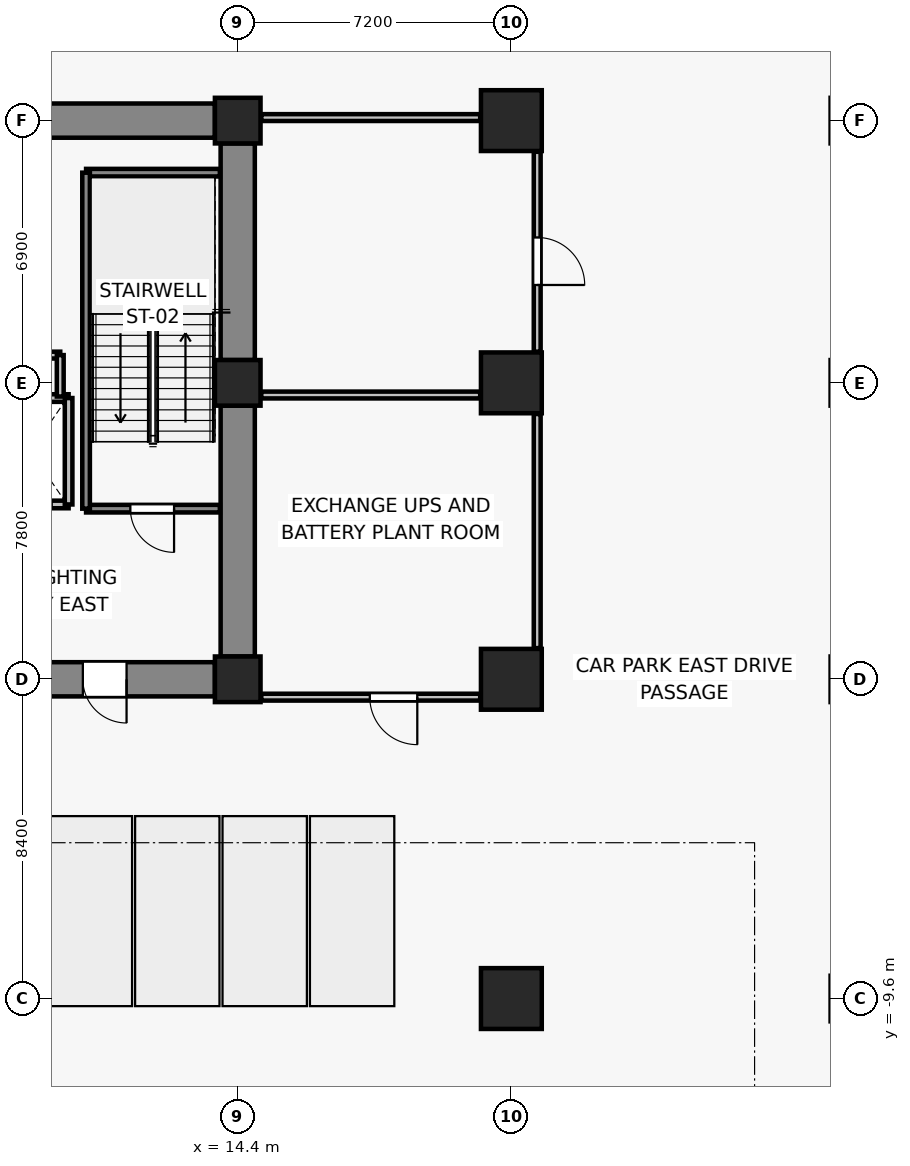
"""IFC4 building model, lengths in metres.
Left out: names, types, materials, properties, quantities, classifications, styles, units other than length and angle.
Written with IfcOpenShell. Run it as: python <this file> out.ifc"""

import sys

from ifc_helpers import new_model, si_unit, direction, frame, frame_2d, origin, origin_2d, place, context, subcontext, project, spatial, rectangle, extrude, source, transform, mapped, element, fill, save


model = new_model("IFC4")
c1 = context("Model", 3, precision=1e-05, world=origin(), true_north=direction((0.0, 1.0)))
c2 = subcontext(c1, "Body", "Model", "MODEL_VIEW")
j1 = project(units=[si_unit("LENGTHUNIT", "METRE"), si_unit("PLANEANGLEUNIT", "RADIAN")], contexts=[c1])
p1 = place(None, origin())
s1 = spatial("IfcSite", under=j1, at=p1, CompositionType="ELEMENT")
p2 = place(p1, origin())
s2 = spatial("IfcBuilding", under=s1, at=p2, CompositionType="ELEMENT")
p3 = place(p2, frame((0.0, 0.0, -4.4)))
s3 = spatial("IfcBuildingStorey", under=s2, at=p3, CompositionType="ELEMENT", Elevation=-4.4)
for number, where, z_axis, x_axis in (
    (1, (14.4, -1.2, 0.0), (0.0, 0.0, 1.0), (1.0, 0.0, 0.0)),
    (2, (14.4, 6.6, 0.0), (0.0, 0.0, 1.0), (1.0, 0.0, 0.0)),
    (3, (14.4, 13.5, 0.0), (0.0, 0.0, 1.0), (1.0, 0.0, 0.0)),
):
    element("IfcColumn", number, at=place(p3, frame(where, z_axis=z_axis, x_axis=x_axis)), inside=s3, PredefinedType="COLUMN", context=c2, shape_type="SweptSolid", body=[
        extrude(rectangle(XDim=1.2, YDim=1.2, at=origin_2d()), origin(), (0.0, 0.0, 1.0), 4.4),
    ])
for number, where, z_axis, x_axis in (
    (4, (21.6, -9.6, 0.0), (0.0, 0.0, 1.0), (1.0, 0.0, 0.0)),
    (5, (21.6, -1.2, 0.0), (0.0, 0.0, 1.0), (1.0, 0.0, 0.0)),
    (6, (21.6, 6.6, 0.0), (0.0, 0.0, 1.0), (1.0, 0.0, 0.0)),
    (7, (21.6, 13.5, 0.0), (0.0, 0.0, 1.0), (1.0, 0.0, 0.0)),
):
    element("IfcColumn", number, at=place(p3, frame(where, z_axis=z_axis, x_axis=x_axis)), inside=s3, PredefinedType="COLUMN", context=c2, shape_type="SweptSolid", body=[
        extrude(rectangle(XDim=1.6, YDim=1.6, at=origin_2d()), origin(), (0.0, 0.0, 1.0), 4.4),
    ])
p4 = place(p3, frame((7.8, 13.5, 0.0), z_axis=(0.0, 0.0, 1.0), x_axis=(1.0, 0.0, 0.0)))
e8 = element("IfcWall", 8, at=p4, inside=s3, PredefinedType="SHEAR", context=c2, shape_type="SweptSolid", body=[
    extrude(rectangle(XDim=6.0, YDim=0.9, at=frame_2d((3.0, 0.0))), origin(), (0.0, 0.0, 1.0), 4.1),
])
p5 = place(p3, frame((14.4, -0.6, 0.0), z_axis=(0.0, 0.0, 1.0), x_axis=(0.0, 1.0, 0.0)))
e9 = element("IfcWall", 9, at=p5, inside=s3, PredefinedType="SHEAR", context=c2, shape_type="SweptSolid", body=[
    extrude(rectangle(XDim=6.6, YDim=0.9, at=frame_2d((3.3, 0.0))), origin(), (0.0, 0.0, 1.0), 4.1),
])
p6 = place(p3, frame((14.4, 7.2, 0.0), z_axis=(0.0, 0.0, 1.0), x_axis=(0.0, 1.0, 0.0)))
e10 = element("IfcWall", 10, at=p6, inside=s3, PredefinedType="SHEAR", context=c2, shape_type="SweptSolid", body=[
    extrude(rectangle(XDim=5.7, YDim=0.9, at=frame_2d((2.85, 0.0))), origin(), (0.0, 0.0, 1.0), 4.1),
])
p7 = place(p3, frame((13.8, -1.2, 0.0), z_axis=(0.0, 0.0, 1.0), x_axis=(-1.0, 0.0, 0.0)))
e11 = element("IfcWall", 11, at=p7, inside=s3, PredefinedType="SHEAR", context=c2, shape_type="SweptSolid", body=[
    extrude(rectangle(XDim=6.0, YDim=0.9, at=frame_2d((3.0, 0.0))), origin(), (0.0, 0.0, 1.0), 4.1),
])
p8 = place(p7, frame((2.325, 0.0, 0.0)))
e12 = element("IfcOpeningElement", 12, at=p8, cuts=e11, PredefinedType="OPENING", context=c2, shape_type="SweptSolid", body=[
    extrude(rectangle(XDim=1.15, YDim=2.15, at=frame_2d((0.575, 1.075))), frame((0.0, 0.46, 0.0), z_axis=(0.0, -1.0, 0.0), x_axis=(1.0, 0.0, 0.0)), (0.0, 0.0, 1.0), 0.92),
])
p9 = place(p3, frame((9.95, 3.4, 0.0), z_axis=(0.0, 0.0, 1.0), x_axis=(-1.0, 0.0, 0.0)))
e13 = element("IfcWall", 13, at=p9, inside=s3, PredefinedType="SOLIDWALL", context=c2, shape_type="SweptSolid", body=[
    extrude(rectangle(XDim=2.0, YDim=0.2, at=frame_2d((1.0, 0.0))), origin(), (0.0, 0.0, 1.0), 4.1),
])
p10 = place(p9, frame((0.45, 0.0, 0.0)))
e14 = element("IfcOpeningElement", 14, at=p10, cuts=e13, PredefinedType="OPENING", context=c2, shape_type="SweptSolid", body=[
    extrude(rectangle(XDim=1.1, YDim=2.2, at=frame_2d((0.55, 1.1))), frame((0.0, 0.11, 0.0), z_axis=(0.0, -1.0, 0.0), x_axis=(1.0, 0.0, 0.0)), (0.0, 0.0, 1.0), 0.22),
])
p11 = place(p3, frame((7.95, 6.2, 0.0), z_axis=(0.0, 0.0, 1.0), x_axis=(1.0, 0.0, 0.0)))
e15 = element("IfcWall", 15, at=p11, inside=s3, PredefinedType="SOLIDWALL", context=c2, shape_type="SweptSolid", body=[
    extrude(rectangle(XDim=2.0, YDim=0.2, at=frame_2d((1.0, 0.0))), origin(), (0.0, 0.0, 1.0), 4.1),
])
p12 = place(p3, frame((9.95, 6.2, 0.0), z_axis=(0.0, 0.0, 1.0), x_axis=(0.0, -1.0, 0.0)))
e16 = element("IfcWall", 16, at=p12, inside=s3, PredefinedType="SOLIDWALL", context=c2, shape_type="SweptSolid", body=[
    extrude(rectangle(XDim=2.8, YDim=0.2, at=frame_2d((1.4, 0.0))), origin(), (0.0, 0.0, 1.0), 4.1),
])
p13 = place(p3, frame((13.93, 3.29, 0.0), z_axis=(0.0, 0.0, 1.0), x_axis=(-1.0, 0.0, 0.0)))
e17 = element("IfcWall", 17, at=p13, inside=s3, PredefinedType="SOLIDWALL", context=c2, shape_type="SweptSolid", body=[
    extrude(rectangle(XDim=3.52, YDim=0.2, at=frame_2d((1.76, 0.0))), origin(), (0.0, 0.0, 1.0), 4.1),
])
p14 = place(p13, frame((1.205, 0.0, 0.0)))
e18 = element("IfcOpeningElement", 18, at=p14, cuts=e17, PredefinedType="OPENING", context=c2, shape_type="SweptSolid", body=[
    extrude(rectangle(XDim=1.15, YDim=2.15, at=frame_2d((0.575, 1.075))), frame((0.0, 0.11, 0.0), z_axis=(0.0, -1.0, 0.0), x_axis=(1.0, 0.0, 0.0)), (0.0, 0.0, 1.0), 0.22),
])
p15 = place(p3, frame((10.41, 12.13, 0.0), z_axis=(0.0, 0.0, 1.0), x_axis=(1.0, 0.0, 0.0)))
e19 = element("IfcWall", 19, at=p15, inside=s3, PredefinedType="SOLIDWALL", context=c2, shape_type="SweptSolid", body=[
    extrude(rectangle(XDim=3.52, YDim=0.2, at=frame_2d((1.76, 0.0))), origin(), (0.0, 0.0, 1.0), 4.1),
])
p16 = place(p3, frame((10.41, 3.29, 0.0), z_axis=(0.0, 0.0, 1.0), x_axis=(0.0, 1.0, 0.0)))
e20 = element("IfcWall", 20, at=p16, inside=s3, PredefinedType="SOLIDWALL", context=c2, shape_type="SweptSolid", body=[
    extrude(rectangle(XDim=8.84, YDim=0.2, at=frame_2d((4.42, 0.0))), origin(), (0.0, 0.0, 1.0), 4.1),
])
p17 = place(p3, frame((7.47, 7.33, 0.0), z_axis=(0.0, 0.0, 1.0), x_axis=(1.0, 0.0, 0.0)))
e21 = element("IfcWall", 21, at=p17, inside=s3, PredefinedType="PARTITIONING", context=c2, shape_type="SweptSolid", body=[
    extrude(rectangle(XDim=2.26, YDim=0.18, at=frame_2d((1.13, 0.0))), origin(), (0.0, 0.0, 1.0), 3.19),
])
p18 = place(p17, frame((0.69, 0.0, 0.0)))
e22 = element("IfcOpeningElement", 22, at=p18, cuts=e21, PredefinedType="OPENING", context=c2, shape_type="SweptSolid", body=[
    extrude(rectangle(XDim=0.88, YDim=2.1, at=frame_2d((0.44, 1.05))), frame((0.0, 0.1, 0.0), z_axis=(0.0, -1.0, 0.0), x_axis=(1.0, 0.0, 0.0)), (0.0, 0.0, 1.0), 0.2),
])
p19 = place(p3, frame((9.73, 7.33, 0.0), z_axis=(0.0, 0.0, 1.0), x_axis=(0.0, -1.0, 0.0)))
e23 = element("IfcWall", 23, at=p19, inside=s3, PredefinedType="PARTITIONING", context=c2, shape_type="SweptSolid", body=[
    extrude(rectangle(XDim=1.09, YDim=0.18, at=frame_2d((0.545, 0.0))), origin(), (0.0, 0.0, 1.0), 4.1),
])
p20 = place(p3, frame((20.78, -1.67, 0.0), z_axis=(0.0, 0.0, 1.0), x_axis=(-1.0, 0.0, 0.0)))
e24 = element("IfcWall", 24, at=p20, inside=s3, PredefinedType="PARTITIONING", context=c2, shape_type="SweptSolid", body=[
    extrude(rectangle(XDim=5.76, YDim=0.18, at=frame_2d((2.88, 0.0))), origin(), (0.0, 0.0, 1.0), 4.1),
])
p21 = place(p20, frame((1.655, 0.0, 0.0)))
e25 = element("IfcOpeningElement", 25, at=p21, cuts=e24, PredefinedType="OPENING", context=c2, shape_type="SweptSolid", body=[
    extrude(rectangle(XDim=1.25, YDim=2.15, at=frame_2d((0.625, 1.075))), frame((0.0, 0.1, 0.0), z_axis=(0.0, -1.0, 0.0), x_axis=(1.0, 0.0, 0.0)), (0.0, 0.0, 1.0), 0.2),
])
p22 = place(p3, frame((15.02, 6.28, 0.0), z_axis=(0.0, 0.0, 1.0), x_axis=(1.0, 0.0, 0.0)))
e26 = element("IfcWall", 26, at=p22, inside=s3, PredefinedType="PARTITIONING", context=c2, shape_type="SweptSolid", body=[
    extrude(rectangle(XDim=5.76, YDim=0.18, at=frame_2d((2.88, 0.0))), origin(), (0.0, 0.0, 1.0), 4.1),
])
p23 = place(p3, frame((22.28, 5.78, 0.0), z_axis=(0.0, 0.0, 1.0), x_axis=(0.0, -1.0, 0.0)))
e27 = element("IfcWall", 27, at=p23, inside=s3, PredefinedType="PARTITIONING", context=c2, shape_type="SweptSolid", body=[
    extrude(rectangle(XDim=6.16, YDim=0.18, at=frame_2d((3.08, 0.0))), origin(), (0.0, 0.0, 1.0), 3.473),
])
p24 = place(p3, frame((15.02, 13.58, 0.0), z_axis=(0.0, 0.0, 1.0), x_axis=(1.0, 0.0, 0.0)))
e28 = element("IfcWall", 28, at=p24, inside=s3, PredefinedType="PARTITIONING", context=c2, shape_type="SweptSolid", body=[
    extrude(rectangle(XDim=5.76, YDim=0.18, at=frame_2d((2.88, 0.0))), origin(), (0.0, 0.0, 1.0), 3.19),
])
p25 = place(p3, frame((22.28, 12.68, 0.0), z_axis=(0.0, 0.0, 1.0), x_axis=(0.0, -1.0, 0.0)))
e29 = element("IfcWall", 29, at=p25, inside=s3, PredefinedType="PARTITIONING", context=c2, shape_type="SweptSolid", body=[
    extrude(rectangle(XDim=5.26, YDim=0.18, at=frame_2d((2.63, 0.0))), origin(), (0.0, 0.0, 1.0), 4.1),
])
p26 = place(p25, frame((2.255, 0.0, 0.0)))
e30 = element("IfcOpeningElement", 30, at=p26, cuts=e29, PredefinedType="OPENING", context=c2, shape_type="SweptSolid", body=[
    extrude(rectangle(XDim=1.25, YDim=2.15, at=frame_2d((0.625, 1.075))), frame((0.0, 0.1, 0.0), z_axis=(0.0, -1.0, 0.0), x_axis=(1.0, 0.0, 0.0)), (0.0, 0.0, 1.0), 0.2),
])
m1 = source(origin(), c2, "Body", "SweptSolid", [
    extrude(rectangle(XDim=1.15, YDim=2.15, at=frame_2d((0.575, 1.075))), frame((0.0, 0.025, 0.0), z_axis=(0.0, -1.0, 0.0), x_axis=(1.0, 0.0, 0.0)), (0.0, 0.0, 1.0), 0.05),
])
p27 = place(p14, origin())
e31 = element("IfcDoor", 31, at=p27, inside=s3, OperationType="SINGLE_SWING_LEFT", PredefinedType="DOOR", context=c2, shape_type="MappedRepresentation", body=[
    mapped(m1, transform((0.0, 0.0, 0.0), x_axis=(1.0, 0.0, 0.0), y_axis=(0.0, 1.0, 0.0), z_axis=(0.0, 0.0, 1.0), scale=1.0)),
])
fill(e18, e31)
p28 = place(p8, origin())
e32 = element("IfcDoor", 32, at=p28, inside=s3, OperationType="SINGLE_SWING_LEFT", PredefinedType="DOOR", context=c2, shape_type="MappedRepresentation", body=[
    mapped(m1, transform((0.0, 0.0, 0.0), x_axis=(1.0, 0.0, 0.0), y_axis=(0.0, 1.0, 0.0), z_axis=(0.0, 0.0, 1.0), scale=1.0)),
])
fill(e12, e32)
m2 = source(origin(), c2, "Body", "SweptSolid", [
    extrude(rectangle(XDim=1.25, YDim=2.15, at=frame_2d((0.625, 1.075))), frame((0.0, 0.025, 0.0), z_axis=(0.0, -1.0, 0.0), x_axis=(1.0, 0.0, 0.0)), (0.0, 0.0, 1.0), 0.05),
])
p29 = place(p21, origin())
e33 = element("IfcDoor", 33, at=p29, inside=s3, OperationType="SINGLE_SWING_LEFT", PredefinedType="DOOR", context=c2, shape_type="MappedRepresentation", body=[
    mapped(m2, transform((0.0, 0.0, 0.0), x_axis=(1.0, 0.0, 0.0), y_axis=(0.0, 1.0, 0.0), z_axis=(0.0, 0.0, 1.0), scale=1.0)),
])
fill(e25, e33)
p30 = place(p26, origin())
e34 = element("IfcDoor", 34, at=p30, inside=s3, OperationType="SINGLE_SWING_RIGHT", PredefinedType="DOOR", context=c2, shape_type="MappedRepresentation", body=[
    mapped(m2, transform((0.0, 0.0, 0.0), x_axis=(1.0, 0.0, 0.0), y_axis=(0.0, 1.0, 0.0), z_axis=(0.0, 0.0, 1.0), scale=1.0)),
])
fill(e30, e34)
save(model, sys.argv[1])
